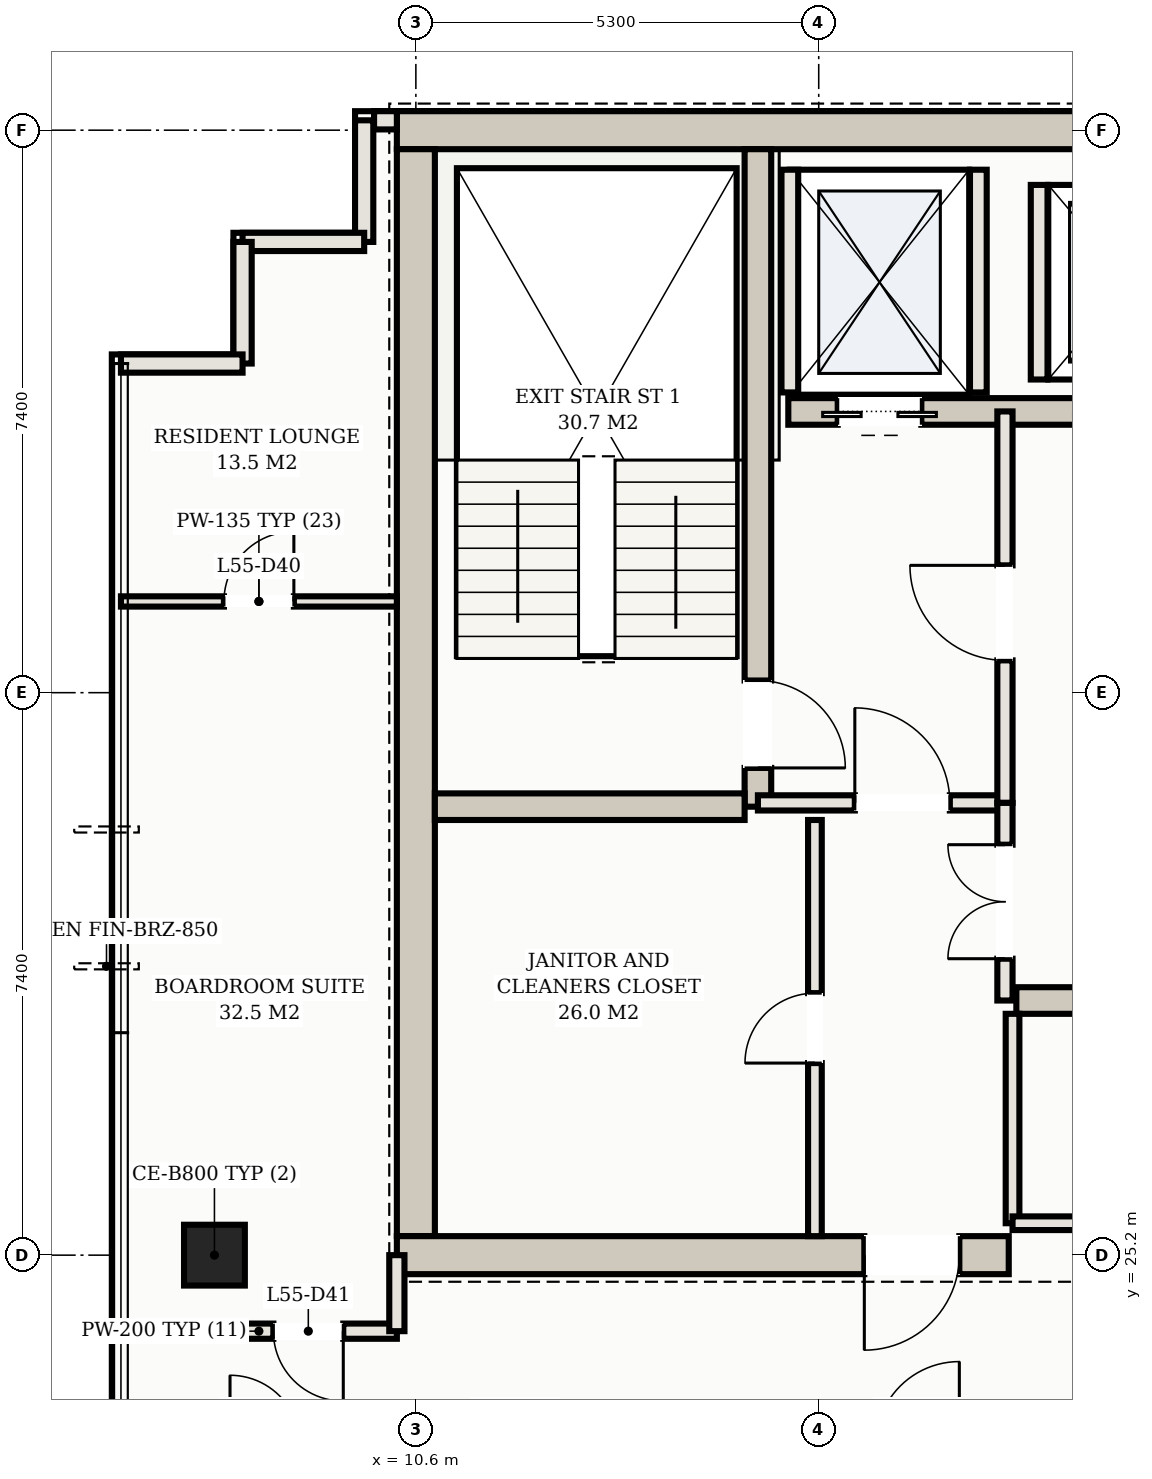
"""IFC4 building model, lengths in metres.
Left out: names, types, materials, properties, quantities, classifications, styles, units other than length and angle.
Written with IfcOpenShell. Run it as: python <this file> out.ifc"""

import sys

from ifc_helpers import new_model, si_unit, direction, frame, frame_2d, origin, origin_2d, place, context, subcontext, project, spatial, rectangle, hollow_rectangle, extrude, element, fill, save


model = new_model("IFC4")
c1 = context("Model", 3, precision=1e-05, world=origin(), true_north=direction((0.0, 1.0)))
c2 = subcontext(c1, "Body", "Model", "MODEL_VIEW")
j1 = project(units=[si_unit("LENGTHUNIT", "METRE"), si_unit("PLANEANGLEUNIT", "RADIAN")], contexts=[c1])
p1 = place(None, origin())
s1 = spatial("IfcSite", under=j1, at=p1, CompositionType="ELEMENT")
p2 = place(p1, origin())
s2 = spatial("IfcBuilding", under=s1, at=p2, CompositionType="ELEMENT")
p3 = place(p2, frame((0.0, 0.0, 203.3)))
s3 = spatial("IfcBuildingStorey", under=s2, at=p3, CompositionType="ELEMENT", Elevation=203.3)
p4 = place(p3, frame((10.35, 40.0, 0.0), z_axis=(0.0, 0.0, 1.0), x_axis=(1.0, 0.0, 0.0)))
e1 = element("IfcWall", 1, at=p4, inside=s3, PredefinedType="SHEAR", context=c2, shape_type="SweptSolid", body=[
    extrude(rectangle(XDim=32.3, YDim=0.5, at=frame_2d((16.15, 0.0))), origin(), (0.0, 0.0, 1.0), 3.11),
])
p5 = place(p3, frame((10.6, 25.45, 0.0), z_axis=(0.0, 0.0, 1.0), x_axis=(0.0, 1.0, 0.0)))
e2 = element("IfcWall", 2, at=p5, inside=s3, PredefinedType="SHEAR", context=c2, shape_type="SweptSolid", body=[
    extrude(rectangle(XDim=14.3, YDim=0.5, at=frame_2d((7.15, 0.0))), origin(), (0.0, 0.0, 1.0), 3.11),
])
p6 = place(p3, frame((10.35, 25.2, 0.0), z_axis=(0.0, 0.0, 1.0), x_axis=(1.0, 0.0, 0.0)))
e3 = element("IfcWall", 3, at=p6, inside=s3, PredefinedType="SHEAR", context=c2, shape_type="SweptSolid", body=[
    extrude(rectangle(XDim=8.05, YDim=0.5, at=frame_2d((4.025, 0.0))), origin(), (0.0, 0.0, 1.0), 3.11),
])
p7 = place(p6, frame((6.15, 0.0, 0.0)))
e4 = element("IfcOpeningElement", 4, at=p7, cuts=e3, PredefinedType="OPENING", context=c2, shape_type="SweptSolid", body=[
    extrude(rectangle(XDim=1.25, YDim=2.2, at=frame_2d((0.625, 1.1))), frame((0.0, 0.26, 0.0), z_axis=(0.0, -1.0, 0.0), x_axis=(1.0, 0.0, 0.0)), (0.0, 0.0, 1.0), 0.52),
])
p8 = place(p3, frame((15.1, 31.1, 0.0), z_axis=(0.0, 0.0, 1.0), x_axis=(0.0, 1.0, 0.0)))
e5 = element("IfcWall", 5, at=p8, inside=s3, PredefinedType="SHEAR", context=c2, shape_type="SweptSolid", body=[
    extrude(rectangle(XDim=8.65, YDim=0.35, at=frame_2d((4.325, 0.0))), origin(), (0.0, 0.0, 1.0), 3.11),
])
p9 = place(p8, frame((0.51, 0.0, 0.0)))
e6 = element("IfcOpeningElement", 6, at=p9, cuts=e5, PredefinedType="OPENING", context=c2, shape_type="SweptSolid", body=[
    extrude(rectangle(XDim=1.15, YDim=2.2, at=frame_2d((0.575, 1.1))), frame((0.0, 0.185, 0.0), z_axis=(0.0, -1.0, 0.0), x_axis=(1.0, 0.0, 0.0)), (0.0, 0.0, 1.0), 0.37),
])
p10 = place(p3, frame((10.85, 31.1, 0.0), z_axis=(0.0, 0.0, 1.0), x_axis=(1.0, 0.0, 0.0)))
e7 = element("IfcWall", 7, at=p10, inside=s3, PredefinedType="SHEAR", context=c2, shape_type="SweptSolid", body=[
    extrude(rectangle(XDim=4.075, YDim=0.35, at=frame_2d((2.038, 0.0))), origin(), (0.0, 0.0, 1.0), 3.11),
])
p11 = place(p3, frame((15.5, 36.3, 0.0), z_axis=(0.0, 0.0, 1.0), x_axis=(1.0, 0.0, 0.0)))
e8 = element("IfcWall", 8, at=p11, inside=s3, PredefinedType="SHEAR", context=c2, shape_type="SweptSolid", body=[
    extrude(rectangle(XDim=22.0, YDim=0.35, at=frame_2d((11.0, 0.0))), origin(), (0.0, 0.0, 1.0), 3.11),
])
p12 = place(p11, frame((0.65, 0.0, 0.0)))
e9 = element("IfcOpeningElement", 9, at=p12, cuts=e8, PredefinedType="OPENING", context=c2, shape_type="SweptSolid", body=[
    extrude(rectangle(XDim=1.1, YDim=2.15, at=frame_2d((0.55, 1.075))), frame((0.0, 0.185, 0.0), z_axis=(0.0, -1.0, 0.0), x_axis=(1.0, 0.0, 0.0)), (0.0, 0.0, 1.0), 0.37),
])
p13 = place(p11, frame((20.25, 0.0, 0.0)))
e10 = element("IfcOpeningElement", 10, at=p13, cuts=e8, PredefinedType="OPENING", context=c2, shape_type="SweptSolid", body=[
    extrude(rectangle(XDim=1.1, YDim=2.15, at=frame_2d((0.55, 1.075))), frame((0.0, 0.185, 0.0), z_axis=(0.0, -1.0, 0.0), x_axis=(1.0, 0.0, 0.0)), (0.0, 0.0, 1.0), 0.37),
])
p14 = place(p11, frame((17.05, 0.0, 0.0)))
e11 = element("IfcOpeningElement", 11, at=p14, cuts=e8, PredefinedType="OPENING", context=c2, shape_type="SweptSolid", body=[
    extrude(rectangle(XDim=1.3, YDim=2.2, at=frame_2d((0.65, 1.1))), frame((0.0, 0.185, 0.0), z_axis=(0.0, -1.0, 0.0), x_axis=(1.0, 0.0, 0.0)), (0.0, 0.0, 1.0), 0.37),
])
p15 = place(p11, frame((3.95, 0.0, 0.0)))
e12 = element("IfcOpeningElement", 12, at=p15, cuts=e8, PredefinedType="OPENING", context=c2, shape_type="SweptSolid", body=[
    extrude(rectangle(XDim=1.1, YDim=2.15, at=frame_2d((0.55, 1.075))), frame((0.0, 0.185, 0.0), z_axis=(0.0, -1.0, 0.0), x_axis=(1.0, 0.0, 0.0)), (0.0, 0.0, 1.0), 0.37),
])
p16 = place(p11, frame((6.55, 0.0, 0.0)))
e13 = element("IfcOpeningElement", 13, at=p16, cuts=e8, PredefinedType="OPENING", context=c2, shape_type="SweptSolid", body=[
    extrude(rectangle(XDim=1.1, YDim=2.15, at=frame_2d((0.55, 1.075))), frame((0.0, 0.185, 0.0), z_axis=(0.0, -1.0, 0.0), x_axis=(1.0, 0.0, 0.0)), (0.0, 0.0, 1.0), 0.37),
])
p17 = place(p11, frame((9.15, 0.0, 0.0)))
e14 = element("IfcOpeningElement", 14, at=p17, cuts=e8, PredefinedType="OPENING", context=c2, shape_type="SweptSolid", body=[
    extrude(rectangle(XDim=1.1, YDim=2.15, at=frame_2d((0.55, 1.075))), frame((0.0, 0.185, 0.0), z_axis=(0.0, -1.0, 0.0), x_axis=(1.0, 0.0, 0.0)), (0.0, 0.0, 1.0), 0.37),
])
p18 = place(p3, frame((18.5, 28.55, 0.0), z_axis=(0.0, 0.0, 1.0), x_axis=(1.0, 0.0, 0.0)))
e15 = element("IfcWall", 15, at=p18, inside=s3, PredefinedType="SHEAR", context=c2, shape_type="SweptSolid", body=[
    extrude(rectangle(XDim=16.0, YDim=0.35, at=frame_2d((8.0, 0.0))), origin(), (0.0, 0.0, 1.0), 3.11),
])
p19 = place(p3, frame((7.95, 25.2, 0.0), z_axis=(0.0, 0.0, 1.0), x_axis=(1.0, 0.0, 0.0)))
e16 = element("IfcColumn", 16, at=p19, inside=s3, PredefinedType="COLUMN", context=c2, shape_type="SweptSolid", body=[
    extrude(hollow_rectangle(XDim=0.8, YDim=0.8, WallThickness=0.028, at=origin_2d()), origin(), (0.0, 0.0, 1.0), 3.3),
])
for number, where, z_axis, x_axis in (
    (17, (15.52, 36.55, 0.0), (0.0, 0.0, 1.0), (0.0, 1.0, 0.0)),
    (18, (18.0, 36.55, 0.0), (0.0, 0.0, 1.0), (0.0, 1.0, 0.0)),
):
    element("IfcWall", number, at=place(p3, frame(where, z_axis=z_axis, x_axis=x_axis)), inside=s3, PredefinedType="SOLIDWALL", context=c2, shape_type="SweptSolid", body=[
        extrude(rectangle(XDim=2.93, YDim=0.22, at=frame_2d((1.465, 0.0))), origin(), (0.0, 0.0, 1.0), 3.11),
    ])
p20 = place(p3, frame((18.8, 36.72, 0.0), z_axis=(0.0, 0.0, 1.0), x_axis=(0.0, 1.0, 0.0)))
e19 = element("IfcWall", 19, at=p20, inside=s3, PredefinedType="SOLIDWALL", context=c2, shape_type="SweptSolid", body=[
    extrude(rectangle(XDim=2.56, YDim=0.22, at=frame_2d((1.28, 0.0))), origin(), (0.0, 0.0, 1.0), 3.11),
])
p21 = place(p3, frame((10.35, 40.13, 0.0), z_axis=(0.0, 0.0, 1.0), x_axis=(-1.0, 0.0, 0.0)))
e20 = element("IfcWall", 20, at=p21, inside=s3, PredefinedType="SOLIDWALL", context=c2, shape_type="SweptSolid", body=[
    extrude(rectangle(XDim=0.3, YDim=0.24, at=frame_2d((0.15, 0.0))), origin(), (0.0, 0.0, 1.0), 3.11),
])
for number, where, z_axis, x_axis in (
    (21, (9.92, 40.13, 0.0), (0.0, 0.0, 1.0), (0.0, -1.0, 0.0)),
    (22, (9.92, 38.53, 0.0), (0.0, 0.0, 1.0), (-1.0, 0.0, 0.0)),
):
    element("IfcWall", number, at=place(p3, frame(where, z_axis=z_axis, x_axis=x_axis)), inside=s3, PredefinedType="SOLIDWALL", context=c2, shape_type="SweptSolid", body=[
        extrude(rectangle(XDim=1.6, YDim=0.24, at=frame_2d((0.8, 0.0))), origin(), (0.0, 0.0, 1.0), 3.11),
    ])
for number, where, z_axis, x_axis in (
    (23, (8.32, 38.53, 0.0), (0.0, 0.0, 1.0), (0.0, -1.0, 0.0)),
    (24, (8.32, 36.93, 0.0), (0.0, 0.0, 1.0), (-1.0, 0.0, 0.0)),
):
    element("IfcWall", number, at=place(p3, frame(where, z_axis=z_axis, x_axis=x_axis)), inside=s3, PredefinedType="SOLIDWALL", context=c2, shape_type="SweptSolid", body=[
        extrude(rectangle(XDim=1.6, YDim=0.24, at=frame_2d((0.8, 0.0))), origin(), (0.0, 0.0, 1.0), 3.11),
    ])
p22 = place(p3, frame((15.1, 31.15, 0.0), z_axis=(0.0, 0.0, 1.0), x_axis=(1.0, 0.0, 0.0)))
e25 = element("IfcWall", 25, at=p22, inside=s3, PredefinedType="PARTITIONING", context=c2, shape_type="SweptSolid", body=[
    extrude(rectangle(XDim=3.25, YDim=0.2, at=frame_2d((1.625, 0.0))), origin(), (0.0, 0.0, 1.0), 2.43),
])
p23 = place(p22, frame((1.275, 0.0, 0.0)))
e26 = element("IfcOpeningElement", 26, at=p23, cuts=e25, PredefinedType="OPENING", context=c2, shape_type="SweptSolid", body=[
    extrude(rectangle(XDim=1.25, YDim=2.2, at=frame_2d((0.625, 1.1))), frame((0.0, 0.11, 0.0), z_axis=(0.0, -1.0, 0.0), x_axis=(1.0, 0.0, 0.0)), (0.0, 0.0, 1.0), 0.22),
])
p24 = place(p3, frame((18.35, 31.15, 0.0), z_axis=(0.0, 0.0, 1.0), x_axis=(0.0, 1.0, 0.0)))
e27 = element("IfcWall", 27, at=p24, inside=s3, PredefinedType="PARTITIONING", context=c2, shape_type="SweptSolid", body=[
    extrude(rectangle(XDim=5.15, YDim=0.2, at=frame_2d((2.575, 0.0))), origin(), (0.0, 0.0, 1.0), 2.43),
])
p25 = place(p24, frame((1.875, 0.0, 0.0)))
e28 = element("IfcOpeningElement", 28, at=p25, cuts=e27, PredefinedType="OPENING", context=c2, shape_type="SweptSolid", body=[
    extrude(rectangle(XDim=1.25, YDim=2.2, at=frame_2d((0.625, 1.1))), frame((0.0, 0.11, 0.0), z_axis=(0.0, -1.0, 0.0), x_axis=(1.0, 0.0, 0.0)), (0.0, 0.0, 1.0), 0.22),
])
p26 = place(p3, frame((15.85, 25.45, 0.0), z_axis=(0.0, 0.0, 1.0), x_axis=(0.0, 1.0, 0.0)))
e29 = element("IfcWall", 29, at=p26, inside=s3, PredefinedType="PARTITIONING", context=c2, shape_type="SweptSolid", body=[
    extrude(rectangle(XDim=5.475, YDim=0.18, at=frame_2d((2.738, 0.0))), origin(), (0.0, 0.0, 1.0), 2.43),
])
p27 = place(p26, frame((2.277, 0.0, 0.0)))
e30 = element("IfcOpeningElement", 30, at=p27, cuts=e29, PredefinedType="OPENING", context=c2, shape_type="SweptSolid", body=[
    extrude(rectangle(XDim=0.92, YDim=2.15, at=frame_2d((0.46, 1.075))), frame((0.0, 0.1, 0.0), z_axis=(0.0, -1.0, 0.0), x_axis=(1.0, 0.0, 0.0)), (0.0, 0.0, 1.0), 0.2),
])
p28 = place(p3, frame((18.35, 28.55, 0.0), z_axis=(0.0, 0.0, 1.0), x_axis=(0.0, 1.0, 0.0)))
e31 = element("IfcWall", 31, at=p28, inside=s3, PredefinedType="PARTITIONING", context=c2, shape_type="SweptSolid", body=[
    extrude(rectangle(XDim=2.6, YDim=0.2, at=frame_2d((1.3, 0.0))), origin(), (0.0, 0.0, 1.0), 2.43),
])
p29 = place(p28, frame((0.55, 0.0, 0.0)))
e32 = element("IfcOpeningElement", 32, at=p29, cuts=e31, PredefinedType="OPENING", context=c2, shape_type="SweptSolid", body=[
    extrude(rectangle(XDim=1.5, YDim=2.25, at=frame_2d((0.75, 1.125))), frame((0.0, 0.11, 0.0), z_axis=(0.0, -1.0, 0.0), x_axis=(1.0, 0.0, 0.0)), (0.0, 0.0, 1.0), 0.22),
])
p30 = place(p3, frame((18.45, 25.62, 0.0), z_axis=(0.0, 0.0, 1.0), x_axis=(0.0, 1.0, 0.0)))
e33 = element("IfcWall", 33, at=p30, inside=s3, PredefinedType="PARTITIONING", context=c2, shape_type="SweptSolid", body=[
    extrude(rectangle(XDim=2.755, YDim=0.18, at=frame_2d((1.377, 0.0))), origin(), (0.0, 0.0, 1.0), 2.43),
])
p31 = place(p3, frame((18.45, 25.62, 0.0), z_axis=(0.0, 0.0, 1.0), x_axis=(1.0, 0.0, 0.0)))
e34 = element("IfcWall", 34, at=p31, inside=s3, PredefinedType="PARTITIONING", context=c2, shape_type="SweptSolid", body=[
    extrude(rectangle(XDim=7.9, YDim=0.18, at=frame_2d((3.95, 0.0))), origin(), (0.0, 0.0, 1.0), 2.43),
])
p32 = place(p31, frame((3.34, 0.0, 0.0)))
e35 = element("IfcOpeningElement", 35, at=p32, cuts=e34, PredefinedType="OPENING", context=c2, shape_type="SweptSolid", body=[
    extrude(rectangle(XDim=0.92, YDim=2.15, at=frame_2d((0.46, 1.075))), frame((0.0, 0.1, 0.0), z_axis=(0.0, -1.0, 0.0), x_axis=(1.0, 0.0, 0.0)), (0.0, 0.0, 1.0), 0.2),
])
p33 = place(p3, frame((6.72, 24.2, 0.0), z_axis=(0.0, 0.0, 1.0), x_axis=(1.0, 0.0, 0.0)))
e36 = element("IfcWall", 36, at=p33, inside=s3, PredefinedType="PARTITIONING", context=c2, shape_type="SweptSolid", body=[
    extrude(rectangle(XDim=3.63, YDim=0.2, at=frame_2d((1.815, 0.0))), origin(), (0.0, 0.0, 1.0), 2.43),
])
p34 = place(p33, frame((2.005, 0.0, 0.0)))
e37 = element("IfcOpeningElement", 37, at=p34, cuts=e36, PredefinedType="OPENING", context=c2, shape_type="SweptSolid", body=[
    extrude(rectangle(XDim=0.92, YDim=2.15, at=frame_2d((0.46, 1.075))), frame((0.0, 0.11, 0.0), z_axis=(0.0, -1.0, 0.0), x_axis=(1.0, 0.0, 0.0)), (0.0, 0.0, 1.0), 0.22),
])
p35 = place(p3, frame((10.35, 24.2, 0.0), z_axis=(0.0, 0.0, 1.0), x_axis=(0.0, 1.0, 0.0)))
e38 = element("IfcWall", 38, at=p35, inside=s3, PredefinedType="PARTITIONING", context=c2, shape_type="SweptSolid", body=[
    extrude(rectangle(XDim=1.0, YDim=0.2, at=frame_2d((0.5, 0.0))), origin(), (0.0, 0.0, 1.0), 2.43),
])
p36 = place(p3, frame((6.72, 33.8, 0.0), z_axis=(0.0, 0.0, 1.0), x_axis=(1.0, 0.0, 0.0)))
e39 = element("IfcWall", 39, at=p36, inside=s3, PredefinedType="PARTITIONING", context=c2, shape_type="SweptSolid", body=[
    extrude(rectangle(XDim=3.63, YDim=0.135, at=frame_2d((1.815, 0.0))), origin(), (0.0, 0.0, 1.0), 2.43),
])
p37 = place(p36, frame((1.355, 0.0, 0.0)))
e40 = element("IfcOpeningElement", 40, at=p37, cuts=e39, PredefinedType="OPENING", context=c2, shape_type="SweptSolid", body=[
    extrude(rectangle(XDim=0.92, YDim=2.15, at=frame_2d((0.46, 1.075))), frame((0.0, 0.078, 0.0), z_axis=(0.0, -1.0, 0.0), x_axis=(1.0, 0.0, 0.0)), (0.0, 0.0, 1.0), 0.155),
])
p38 = place(p12, frame((1.1, 0.0, 0.0), z_axis=(0.0, 0.0, 1.0), x_axis=(-1.0, 0.0, 0.0)))
e41 = element("IfcDoor", 41, at=p38, inside=s3, OperationType="DOUBLE_DOOR_SLIDING", PredefinedType="DOOR", context=c2, shape_type="SweptSolid", body=[
    extrude(rectangle(XDim=1.1, YDim=2.15, at=frame_2d((0.55, 1.075))), frame((0.0, 0.025, 0.0), z_axis=(0.0, -1.0, 0.0), x_axis=(1.0, 0.0, 0.0)), (0.0, 0.0, 1.0), 0.05),
])
fill(e9, e41)
p39 = place(p7, frame((1.25, 0.0, 0.0), z_axis=(0.0, 0.0, 1.0), x_axis=(-1.0, 0.0, 0.0)))
e42 = element("IfcDoor", 42, at=p39, inside=s3, OperationType="SINGLE_SWING_RIGHT", PredefinedType="DOOR", context=c2, shape_type="SweptSolid", body=[
    extrude(rectangle(XDim=1.25, YDim=2.2, at=frame_2d((0.625, 1.1))), frame((0.0, 0.025, 0.0), z_axis=(0.0, -1.0, 0.0), x_axis=(1.0, 0.0, 0.0)), (0.0, 0.0, 1.0), 0.05),
])
fill(e4, e42)
p40 = place(p23, origin())
e43 = element("IfcDoor", 43, at=p40, inside=s3, OperationType="SINGLE_SWING_LEFT", PredefinedType="DOOR", context=c2, shape_type="SweptSolid", body=[
    extrude(rectangle(XDim=1.25, YDim=2.2, at=frame_2d((0.625, 1.1))), frame((0.0, 0.025, 0.0), z_axis=(0.0, -1.0, 0.0), x_axis=(1.0, 0.0, 0.0)), (0.0, 0.0, 1.0), 0.05),
])
fill(e26, e43)
p41 = place(p25, origin())
e44 = element("IfcDoor", 44, at=p41, inside=s3, OperationType="SINGLE_SWING_RIGHT", PredefinedType="DOOR", context=c2, shape_type="SweptSolid", body=[
    extrude(rectangle(XDim=1.25, YDim=2.2, at=frame_2d((0.625, 1.1))), frame((0.0, 0.025, 0.0), z_axis=(0.0, -1.0, 0.0), x_axis=(1.0, 0.0, 0.0)), (0.0, 0.0, 1.0), 0.05),
])
fill(e28, e44)
p42 = place(p9, frame((1.15, 0.0, 0.0), z_axis=(0.0, 0.0, 1.0), x_axis=(-1.0, 0.0, 0.0)))
e45 = element("IfcDoor", 45, at=p42, inside=s3, OperationType="SINGLE_SWING_RIGHT", PredefinedType="DOOR", context=c2, shape_type="SweptSolid", body=[
    extrude(rectangle(XDim=1.15, YDim=2.2, at=frame_2d((0.575, 1.1))), frame((0.0, 0.025, 0.0), z_axis=(0.0, -1.0, 0.0), x_axis=(1.0, 0.0, 0.0)), (0.0, 0.0, 1.0), 0.05),
])
fill(e6, e45)
p43 = place(p27, origin())
e46 = element("IfcDoor", 46, at=p43, inside=s3, OperationType="SINGLE_SWING_LEFT", PredefinedType="DOOR", context=c2, shape_type="SweptSolid", body=[
    extrude(rectangle(XDim=0.92, YDim=2.15, at=frame_2d((0.46, 1.075))), frame((0.0, 0.025, 0.0), z_axis=(0.0, -1.0, 0.0), x_axis=(1.0, 0.0, 0.0)), (0.0, 0.0, 1.0), 0.05),
])
fill(e30, e46)
p44 = place(p29, origin())
e47 = element("IfcDoor", 47, at=p44, inside=s3, OperationType="DOUBLE_DOOR_SINGLE_SWING", PredefinedType="DOOR", context=c2, shape_type="SweptSolid", body=[
    extrude(rectangle(XDim=1.5, YDim=2.25, at=frame_2d((0.75, 1.125))), frame((0.0, 0.025, 0.0), z_axis=(0.0, -1.0, 0.0), x_axis=(1.0, 0.0, 0.0)), (0.0, 0.0, 1.0), 0.05),
])
fill(e32, e47)
p45 = place(p37, origin())
e48 = element("IfcDoor", 48, at=p45, inside=s3, OperationType="SINGLE_SWING_RIGHT", PredefinedType="DOOR", context=c2, shape_type="SweptSolid", body=[
    extrude(rectangle(XDim=0.92, YDim=2.15, at=frame_2d((0.46, 1.075))), frame((0.0, 0.025, 0.0), z_axis=(0.0, -1.0, 0.0), x_axis=(1.0, 0.0, 0.0)), (0.0, 0.0, 1.0), 0.05),
])
fill(e40, e48)
p46 = place(p34, frame((0.92, 0.0, 0.0), z_axis=(0.0, 0.0, 1.0), x_axis=(-1.0, 0.0, 0.0)))
e49 = element("IfcDoor", 49, at=p46, inside=s3, OperationType="SINGLE_SWING_LEFT", PredefinedType="DOOR", context=c2, shape_type="SweptSolid", body=[
    extrude(rectangle(XDim=0.92, YDim=2.15, at=frame_2d((0.46, 1.075))), frame((0.0, 0.025, 0.0), z_axis=(0.0, -1.0, 0.0), x_axis=(1.0, 0.0, 0.0)), (0.0, 0.0, 1.0), 0.05),
])
fill(e37, e49)
save(model, sys.argv[1])
